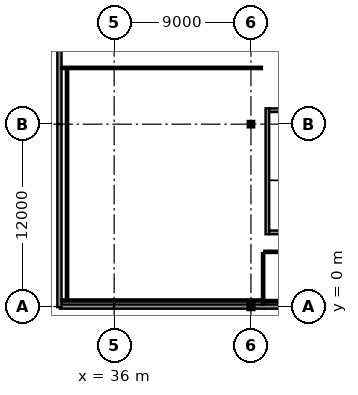
"""IFC4 building model, lengths in metres.
Left out: names, types, materials, properties, quantities, classifications, styles, units other than length and angle.
Written with IfcOpenShell. Run it as: python <this file> out.ifc"""

import sys

from ifc_helpers import new_model, si_unit, direction, frame, frame_2d, origin, origin_2d, place, context, subcontext, project, spatial, rectangle, i_section, extrude, element, fill, save


model = new_model("IFC4")
c1 = context("Model", 3, precision=1e-05, world=origin(), true_north=direction((0.0, 1.0)))
c2 = subcontext(c1, "Body", "Model", "MODEL_VIEW")
j1 = project(units=[si_unit("LENGTHUNIT", "METRE"), si_unit("PLANEANGLEUNIT", "RADIAN")], contexts=[c1])
p1 = place(None, origin())
s1 = spatial("IfcSite", under=j1, at=p1, CompositionType="ELEMENT")
p2 = place(p1, origin())
s2 = spatial("IfcBuilding", under=s1, at=p2, CompositionType="ELEMENT")
p3 = place(p2, frame((0.0, 0.0, 31.4)))
s3 = spatial("IfcBuildingStorey", under=s2, at=p3, CompositionType="ELEMENT", Elevation=31.4)
p4 = place(p3, frame((45.0, 0.0, 0.0), z_axis=(0.0, 0.0, 1.0), x_axis=(0.0, 1.0, 0.0)))
e1 = element("IfcColumn", 1, at=p4, inside=s3, PredefinedType="COLUMN", context=c2, shape_type="SweptSolid", body=[
    extrude(i_section(OverallWidth=0.3, OverallDepth=0.3, WebThickness=0.011, FlangeThickness=0.019, at=origin_2d()), origin(), (0.0, 0.0, 1.0), 4.0),
])
p5 = place(p3, frame((45.0, 12.0, 0.0), z_axis=(0.0, 0.0, 1.0), x_axis=(1.0, 0.0, 0.0)))
e2 = element("IfcColumn", 2, at=p5, inside=s3, PredefinedType="COLUMN", context=c2, shape_type="SweptSolid", body=[
    extrude(i_section(OverallWidth=0.26, OverallDepth=0.26, WebThickness=0.01, FlangeThickness=0.018, at=origin_2d()), origin(), (0.0, 0.0, 1.0), 4.0),
])
p6 = place(p3, frame((32.44, 0.0, 0.0), z_axis=(0.0, 0.0, 1.0), x_axis=(1.0, 0.0, 0.0)))
e3 = element("IfcWall", 3, at=p6, inside=s3, PredefinedType="SOLIDWALL", context=c2, shape_type="SweptSolid", body=[
    extrude(rectangle(XDim=3.57, YDim=0.28, at=frame_2d((1.785, 0.0))), origin(), (0.0, 0.0, 1.0), 2.787),
])
p7 = place(p3, frame((35.99, 0.0, 0.0), z_axis=(0.0, 0.0, 1.0), x_axis=(1.0, 0.0, 0.0)))
e4 = element("IfcWall", 4, at=p7, inside=s3, PredefinedType="SOLIDWALL", context=c2, shape_type="SweptSolid", body=[
    extrude(rectangle(XDim=8.862, YDim=0.28, at=frame_2d((4.431, 0.0))), origin(), (0.0, 0.0, 1.0), 2.787),
])
p8 = place(p3, frame((45.148, 0.0, 0.0), z_axis=(0.0, 0.0, 1.0), x_axis=(1.0, 0.0, 0.0)))
e5 = element("IfcWall", 5, at=p8, inside=s3, PredefinedType="SOLIDWALL", context=c2, shape_type="SweptSolid", body=[
    extrude(rectangle(XDim=8.844, YDim=0.28, at=frame_2d((4.422, 0.0))), origin(), (0.0, 0.0, 1.0), 2.787),
])
p9 = place(p8, frame((2.003, 0.0, 1.05)))
e6 = element("IfcOpeningElement", 6, at=p9, cuts=e5, PredefinedType="OPENING", context=c2, shape_type="SweptSolid", body=[
    extrude(rectangle(XDim=1.3, YDim=1.3, at=frame_2d((0.65, 0.65))), frame((0.0, 0.155, 0.0), z_axis=(0.0, -1.0, 0.0), x_axis=(1.0, 0.0, 0.0)), (0.0, 0.0, 1.0), 0.31),
])
p10 = place(p8, frame((5.541, 0.0, 1.05)))
e7 = element("IfcOpeningElement", 7, at=p10, cuts=e5, PredefinedType="OPENING", context=c2, shape_type="SweptSolid", body=[
    extrude(rectangle(XDim=1.3, YDim=1.3, at=frame_2d((0.65, 0.65))), frame((0.0, 0.155, 0.0), z_axis=(0.0, -1.0, 0.0), x_axis=(1.0, 0.0, 0.0)), (0.0, 0.0, 1.0), 0.31),
])
p11 = place(p3, frame((32.4, 23.96, 0.0), z_axis=(0.0, 0.0, 1.0), x_axis=(0.0, -1.0, 0.0)))
e8 = element("IfcWall", 8, at=p11, inside=s3, PredefinedType="SOLIDWALL", context=c2, shape_type="SweptSolid", body=[
    extrude(rectangle(XDim=11.97, YDim=0.28, at=frame_2d((5.985, 0.0))), origin(), (0.0, 0.0, 1.0), 3.095),
])
p12 = place(p11, frame((2.941, 0.0, 1.05)))
e9 = element("IfcOpeningElement", 9, at=p12, cuts=e8, PredefinedType="OPENING", context=c2, shape_type="SweptSolid", body=[
    extrude(rectangle(XDim=1.3, YDim=1.3, at=frame_2d((0.65, 0.65))), frame((0.0, 0.155, 0.0), z_axis=(0.0, -1.0, 0.0), x_axis=(1.0, 0.0, 0.0)), (0.0, 0.0, 1.0), 0.31),
])
p13 = place(p11, frame((8.5, 0.0, 1.05)))
e10 = element("IfcOpeningElement", 10, at=p13, cuts=e8, PredefinedType="OPENING", context=c2, shape_type="SweptSolid", body=[
    extrude(rectangle(XDim=1.3, YDim=1.3, at=frame_2d((0.65, 0.65))), frame((0.0, 0.155, 0.0), z_axis=(0.0, -1.0, 0.0), x_axis=(1.0, 0.0, 0.0)), (0.0, 0.0, 1.0), 0.31),
])
p14 = place(p3, frame((32.4, 12.01, 0.0), z_axis=(0.0, 0.0, 1.0), x_axis=(0.0, -1.0, 0.0)))
e11 = element("IfcWall", 11, at=p14, inside=s3, PredefinedType="SOLIDWALL", context=c2, shape_type="SweptSolid", body=[
    extrude(rectangle(XDim=12.05, YDim=0.28, at=frame_2d((6.025, 0.0))), origin(), (0.0, 0.0, 1.0), 3.095),
])
p15 = place(p14, frame((2.965, 0.0, 1.05)))
e12 = element("IfcOpeningElement", 12, at=p15, cuts=e11, PredefinedType="OPENING", context=c2, shape_type="SweptSolid", body=[
    extrude(rectangle(XDim=1.3, YDim=1.3, at=frame_2d((0.65, 0.65))), frame((0.0, 0.155, 0.0), z_axis=(0.0, -1.0, 0.0), x_axis=(1.0, 0.0, 0.0)), (0.0, 0.0, 1.0), 0.31),
])
p16 = place(p14, frame((7.785, 0.0, 1.05)))
e13 = element("IfcOpeningElement", 13, at=p16, cuts=e11, PredefinedType="OPENING", context=c2, shape_type="SweptSolid", body=[
    extrude(rectangle(XDim=1.3, YDim=1.3, at=frame_2d((0.65, 0.65))), frame((0.0, 0.155, 0.0), z_axis=(0.0, -1.0, 0.0), x_axis=(1.0, 0.0, 0.0)), (0.0, 0.0, 1.0), 0.31),
])
p17 = place(p3, frame((46.08, 4.76, 0.0), z_axis=(0.0, 0.0, 1.0), x_axis=(0.0, 1.0, 0.0)))
e14 = element("IfcWall", 14, at=p17, inside=s3, PredefinedType="SHEAR", context=c2, shape_type="SweptSolid", body=[
    extrude(rectangle(XDim=8.28, YDim=0.24, at=frame_2d((4.14, 0.0))), origin(), (0.0, 0.0, 1.0), 3.81),
])
for number, where, z_axis, x_axis in (
    (15, (46.2, 4.88, 0.0), (0.0, 0.0, 1.0), (1.0, 0.0, 0.0)),
    (16, (46.2, 12.92, 0.0), (0.0, 0.0, 1.0), (1.0, 0.0, 0.0)),
):
    element("IfcWall", number, at=place(p3, frame(where, z_axis=z_axis, x_axis=x_axis)), inside=s3, PredefinedType="SHEAR", context=c2, shape_type="SweptSolid", body=[
        extrude(rectangle(XDim=3.7, YDim=0.24, at=frame_2d((1.85, 0.0))), origin(), (0.0, 0.0, 1.0), 3.81),
    ])
p18 = place(p3, frame((71.92, 0.36, 0.0), z_axis=(0.0, 0.0, 1.0), x_axis=(-1.0, 0.0, 0.0)))
e17 = element("IfcWall", 17, at=p18, inside=s3, PredefinedType="PARTITIONING", context=c2, shape_type="SweptSolid", body=[
    extrude(rectangle(XDim=26.04, YDim=0.15, at=frame_2d((13.02, 0.0))), origin(), (0.0, 0.0, 1.0), 3.64),
])
p19 = place(p3, frame((45.8, 0.135, 0.0), z_axis=(0.0, 0.0, 1.0), x_axis=(0.0, 1.0, 0.0)))
e18 = element("IfcWall", 18, at=p19, inside=s3, PredefinedType="PARTITIONING", context=c2, shape_type="SweptSolid", body=[
    extrude(rectangle(XDim=3.385, YDim=0.15, at=frame_2d((1.692, 0.0))), origin(), (0.0, 0.0, 1.0), 3.64),
])
p20 = place(p3, frame((45.88, 3.6, 0.0), z_axis=(0.0, 0.0, 1.0), x_axis=(1.0, 0.0, 0.0)))
e19 = element("IfcWall", 19, at=p20, inside=s3, PredefinedType="PARTITIONING", context=c2, shape_type="SweptSolid", body=[
    extrude(rectangle(XDim=58.24, YDim=0.15, at=frame_2d((29.12, 0.0))), origin(), (0.0, 0.0, 1.0), 3.64),
])
p21 = place(p20, frame((27.795, 0.0, 0.0)))
e20 = element("IfcOpeningElement", 20, at=p21, cuts=e19, PredefinedType="OPENING", context=c2, shape_type="SweptSolid", body=[
    extrude(rectangle(XDim=1.05, YDim=2.25, at=frame_2d((0.525, 1.125))), frame((0.0, 0.09, 0.0), z_axis=(0.0, -1.0, 0.0), x_axis=(1.0, 0.0, 0.0)), (0.0, 0.0, 1.0), 0.18),
])
p22 = place(p3, frame((45.73, 0.4, 0.0), z_axis=(0.0, 0.0, 1.0), x_axis=(-1.0, 0.0, 0.0)))
e21 = element("IfcWall", 21, at=p22, inside=s3, PredefinedType="PARTITIONING", context=c2, shape_type="SweptSolid", body=[
    extrude(rectangle(XDim=13.195, YDim=0.15, at=frame_2d((6.598, 0.0))), origin(), (0.0, 0.0, 1.0), 3.64),
])
p23 = place(p3, frame((32.9, 0.47, 0.0), z_axis=(0.0, 0.0, 1.0), x_axis=(0.0, 1.0, 0.0)))
e22 = element("IfcWall", 22, at=p23, inside=s3, PredefinedType="PARTITIONING", context=c2, shape_type="SweptSolid", body=[
    extrude(rectangle(XDim=15.15, YDim=0.15, at=frame_2d((7.575, 0.0))), origin(), (0.0, 0.0, 1.0), 3.64),
])
p24 = place(p3, frame((32.535, 15.7, 0.0), z_axis=(0.0, 0.0, 1.0), x_axis=(1.0, 0.0, 0.0)))
e23 = element("IfcWall", 23, at=p24, inside=s3, PredefinedType="PARTITIONING", context=c2, shape_type="SweptSolid", body=[
    extrude(rectangle(XDim=13.185, YDim=0.15, at=frame_2d((6.593, 0.0))), origin(), (0.0, 0.0, 1.0), 3.64),
])
p25 = place(p24, frame((6.068, 0.0, 0.0)))
e24 = element("IfcOpeningElement", 24, at=p25, cuts=e23, PredefinedType="OPENING", context=c2, shape_type="SweptSolid", body=[
    extrude(rectangle(XDim=1.05, YDim=2.25, at=frame_2d((0.525, 1.125))), frame((0.0, 0.09, 0.0), z_axis=(0.0, -1.0, 0.0), x_axis=(1.0, 0.0, 0.0)), (0.0, 0.0, 1.0), 0.18),
])
p26 = place(p13, origin())
e25 = element("IfcWindow", 25, at=p26, inside=s3, PartitioningType="SINGLE_PANEL", PredefinedType="WINDOW", context=c2, shape_type="SweptSolid", body=[
    extrude(rectangle(XDim=1.3, YDim=1.3, at=frame_2d((0.65, 0.65))), frame((0.0, 0.03, 0.0), z_axis=(0.0, -1.0, 0.0), x_axis=(1.0, 0.0, 0.0)), (0.0, 0.0, 1.0), 0.06),
])
fill(e10, e25)
p27 = place(p15, origin())
e26 = element("IfcWindow", 26, at=p27, inside=s3, PartitioningType="SINGLE_PANEL", PredefinedType="WINDOW", context=c2, shape_type="SweptSolid", body=[
    extrude(rectangle(XDim=1.3, YDim=1.3, at=frame_2d((0.65, 0.65))), frame((0.0, 0.03, 0.0), z_axis=(0.0, -1.0, 0.0), x_axis=(1.0, 0.0, 0.0)), (0.0, 0.0, 1.0), 0.06),
])
fill(e12, e26)
p28 = place(p16, origin())
e27 = element("IfcWindow", 27, at=p28, inside=s3, PartitioningType="SINGLE_PANEL", PredefinedType="WINDOW", context=c2, shape_type="SweptSolid", body=[
    extrude(rectangle(XDim=1.3, YDim=1.3, at=frame_2d((0.65, 0.65))), frame((0.0, 0.03, 0.0), z_axis=(0.0, -1.0, 0.0), x_axis=(1.0, 0.0, 0.0)), (0.0, 0.0, 1.0), 0.06),
])
fill(e13, e27)
p29 = place(p25, origin())
e28 = element("IfcDoor", 28, at=p29, inside=s3, OperationType="SINGLE_SWING_LEFT", PredefinedType="DOOR", context=c2, shape_type="SweptSolid", body=[
    extrude(rectangle(XDim=1.05, YDim=2.25, at=frame_2d((0.525, 1.125))), frame((0.0, 0.025, 0.0), z_axis=(0.0, -1.0, 0.0), x_axis=(1.0, 0.0, 0.0)), (0.0, 0.0, 1.0), 0.05),
])
fill(e24, e28)
save(model, sys.argv[1])
